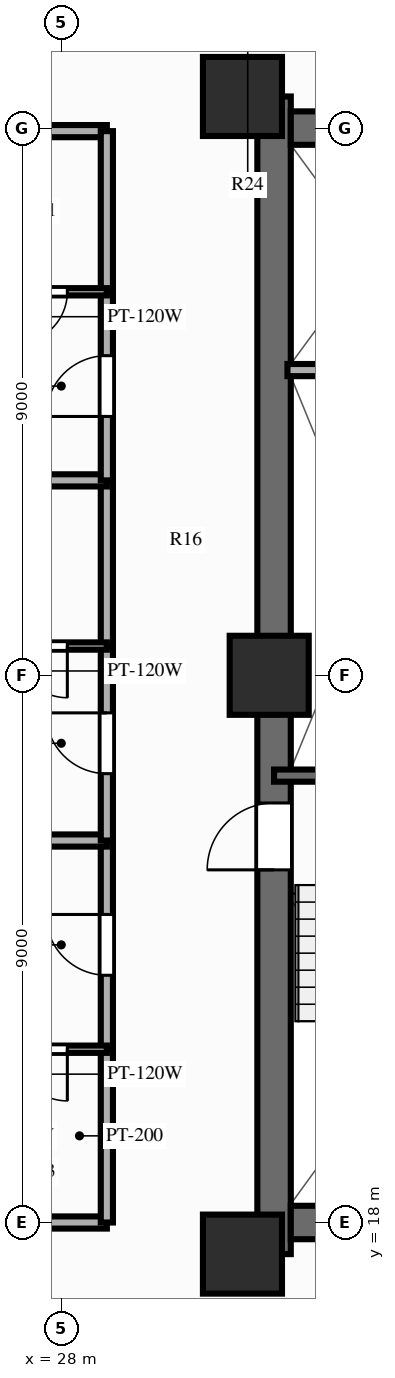
"""IFC4 building model, lengths in metres.
Left out: names, types, materials, properties, quantities, classifications, styles, units other than length and angle.
Written with IfcOpenShell. Run it as: python <this file> out.ifc"""

import sys

from ifc_helpers import new_model, si_unit, direction, frame, frame_2d, origin, origin_2d, place, context, subcontext, project, spatial, rectangle, extrude, source, transform, mapped, element, fill, save


model = new_model("IFC4")
c1 = context("Model", 3, precision=1e-05, world=origin(), true_north=direction((0.0, 1.0)))
c2 = subcontext(c1, "Body", "Model", "MODEL_VIEW")
j1 = project(units=[si_unit("LENGTHUNIT", "METRE"), si_unit("PLANEANGLEUNIT", "RADIAN")], contexts=[c1])
p1 = place(None, origin())
s1 = spatial("IfcSite", under=j1, at=p1, CompositionType="ELEMENT")
p2 = place(p1, origin())
s2 = spatial("IfcBuilding", under=s1, at=p2, CompositionType="ELEMENT")
p3 = place(p2, frame((0.0, 0.0, 86.85)))
s3 = spatial("IfcBuildingStorey", under=s2, at=p3, CompositionType="ELEMENT", Elevation=86.85)
p4 = place(p3, frame((31.5, 17.48, 0.0), z_axis=(0.0, 0.0, 1.0), x_axis=(0.0, 1.0, 0.0)))
e1 = element("IfcWall", 1, at=p4, inside=s3, PredefinedType="SHEAR", context=c2, shape_type="SweptSolid", body=[
    extrude(rectangle(XDim=19.04, YDim=0.55, at=frame_2d((9.52, 0.0))), origin(), (0.0, 0.0, 1.0), 3.0),
])
p5 = place(p4, frame((6.32, 0.0, 0.0)))
e2 = element("IfcOpeningElement", 2, at=p5, cuts=e1, PredefinedType="OPENING", context=c2, shape_type="SweptSolid", body=[
    extrude(rectangle(XDim=1.1, YDim=2.15, at=frame_2d((0.55, 1.075))), frame((0.0, 0.287, 0.0), z_axis=(0.0, -1.0, 0.0), x_axis=(1.0, 0.0, 0.0)), (0.0, 0.0, 1.0), 0.574),
])
p6 = place(p3, frame((31.775, 18.0, 0.0), z_axis=(0.0, 0.0, 1.0), x_axis=(1.0, 0.0, 0.0)))
e3 = element("IfcWall", 3, at=p6, inside=s3, PredefinedType="SHEAR", context=c2, shape_type="SweptSolid", body=[
    extrude(rectangle(XDim=12.45, YDim=0.55, at=frame_2d((6.225, 0.0))), origin(), (0.0, 0.0, 1.0), 3.0),
])
p7 = place(p3, frame((31.775, 36.0, 0.0), z_axis=(0.0, 0.0, 1.0), x_axis=(1.0, 0.0, 0.0)))
e4 = element("IfcWall", 4, at=p7, inside=s3, PredefinedType="SHEAR", context=c2, shape_type="SweptSolid", body=[
    extrude(rectangle(XDim=12.45, YDim=0.55, at=frame_2d((6.225, 0.0))), origin(), (0.0, 0.0, 1.0), 3.0),
])
p8 = place(p7, frame((5.175, 0.0, 0.0), z_axis=(0.0, 0.0, 1.0), x_axis=(-1.0, 0.0, 0.0)))
e5 = element("IfcOpeningElement", 5, at=p8, cuts=e4, PredefinedType="OPENING", context=c2, shape_type="SweptSolid", body=[
    extrude(rectangle(XDim=1.4, YDim=2.15, at=frame_2d((0.7, 1.075))), frame((0.0, 0.287, 0.0), z_axis=(0.0, -1.0, 0.0), x_axis=(1.0, 0.0, 0.0)), (0.0, 0.0, 1.0), 0.574),
])
m1 = source(origin(), c2, "Body", "SweptSolid", [
    extrude(rectangle(XDim=1.3, YDim=1.3, at=origin_2d()), origin(), (0.0, 0.0, 1.0), 3.0),
])
for number, where, z_axis, x_axis in (
    (6, (30.98, 17.48, 0.0), (0.0, 0.0, 1.0), (1.0, 0.0, 0.0)),
    (7, (30.98, 36.52, 0.0), (0.0, 0.0, 1.0), (1.0, 0.0, 0.0)),
    (8, (31.42, 27.0, 0.0), (0.0, 0.0, 1.0), (1.0, 0.0, 0.0)),
):
    element("IfcColumn", number, at=place(p3, frame(where, z_axis=z_axis, x_axis=x_axis)), inside=s3, PredefinedType="COLUMN", context=c2, shape_type="MappedRepresentation", body=[
        mapped(m1, transform((0.0, 0.0, 0.0), scale=1.0)),
    ])
p9 = place(p3, frame((31.5, 25.35, 0.0), z_axis=(0.0, 0.0, 1.0), x_axis=(1.0, 0.0, 0.0)))
e9 = element("IfcWall", 9, at=p9, inside=s3, PredefinedType="SOLIDWALL", context=c2, shape_type="SweptSolid", body=[
    extrude(rectangle(XDim=3.93, YDim=0.2, at=frame_2d((1.965, 0.0))), origin(), (0.0, 0.0, 1.0), 2.79),
])
p10 = place(p3, frame((31.72, 32.02, 0.0), z_axis=(0.0, 0.0, 1.0), x_axis=(1.0, 0.0, 0.0)))
e10 = element("IfcWall", 10, at=p10, inside=s3, PredefinedType="PARTITIONING", context=c2, shape_type="SweptSolid", body=[
    extrude(rectangle(XDim=2.8, YDim=0.2, at=frame_2d((1.4, 0.0))), origin(), (0.0, 0.0, 1.0), 2.79),
])
for number, where, z_axis, x_axis in (
    (11, (28.75, 18.0, 0.0), (0.0, 0.0, 1.0), (-1.0, 0.0, 0.0)),
    (12, (28.75, 35.95, 0.0), (0.0, 0.0, 1.0), (-1.0, 0.0, 0.0)),
):
    element("IfcWall", number, at=place(p3, frame(where, z_axis=z_axis, x_axis=x_axis)), inside=s3, PredefinedType="PARTITIONING", context=c2, shape_type="SweptSolid", body=[
        extrude(rectangle(XDim=16.6, YDim=0.2, at=frame_2d((8.3, 0.0))), origin(), (0.0, 0.0, 1.0), 2.34),
    ])
p11 = place(p3, frame((28.75, 18.0, 0.0), z_axis=(0.0, 0.0, 1.0), x_axis=(0.0, 1.0, 0.0)))
e13 = element("IfcWall", 13, at=p11, inside=s3, PredefinedType="PARTITIONING", context=c2, shape_type="SweptSolid", body=[
    extrude(rectangle(XDim=2.85, YDim=0.2, at=frame_2d((1.425, 0.0))), origin(), (0.0, 0.0, 1.0), 2.79),
])
p12 = place(p3, frame((28.75, 20.85, 0.0), z_axis=(0.0, 0.0, 1.0), x_axis=(0.0, 1.0, 0.0)))
e14 = element("IfcWall", 14, at=p12, inside=s3, PredefinedType="PARTITIONING", context=c2, shape_type="SweptSolid", body=[
    extrude(rectangle(XDim=3.432, YDim=0.2, at=frame_2d((1.716, 0.0))), origin(), (0.0, 0.0, 1.0), 2.79),
])
p13 = place(p12, frame((1.216, 0.0, 0.0)))
e15 = element("IfcOpeningElement", 15, at=p13, cuts=e14, PredefinedType="OPENING", context=c2, shape_type="SweptSolid", body=[
    extrude(rectangle(XDim=1.0, YDim=2.15, at=frame_2d((0.5, 1.075))), frame((0.0, 0.112, 0.0), z_axis=(0.0, -1.0, 0.0), x_axis=(1.0, 0.0, 0.0)), (0.0, 0.0, 1.0), 0.224),
])
p14 = place(p3, frame((28.75, 20.85, 0.0), z_axis=(0.0, 0.0, 1.0), x_axis=(-1.0, 0.0, 0.0)))
e16 = element("IfcWall", 16, at=p14, inside=s3, PredefinedType="PARTITIONING", context=c2, shape_type="SweptSolid", body=[
    extrude(rectangle(XDim=2.15, YDim=0.12, at=frame_2d((1.075, 0.0))), origin(), (0.0, 0.0, 1.0), 2.79),
])
p15 = place(p14, frame((0.65, 0.0, 0.0)))
e17 = element("IfcOpeningElement", 17, at=p15, cuts=e16, PredefinedType="OPENING", context=c2, shape_type="SweptSolid", body=[
    extrude(rectangle(XDim=0.85, YDim=2.05, at=frame_2d((0.425, 1.025))), frame((0.0, 0.072, 0.0), z_axis=(0.0, -1.0, 0.0), x_axis=(1.0, 0.0, 0.0)), (0.0, 0.0, 1.0), 0.144),
])
p16 = place(p3, frame((28.75, 24.282, 0.0), z_axis=(0.0, 0.0, 1.0), x_axis=(-1.0, 0.0, 0.0)))
e18 = element("IfcWall", 18, at=p16, inside=s3, PredefinedType="PARTITIONING", context=c2, shape_type="SweptSolid", body=[
    extrude(rectangle(XDim=16.6, YDim=0.2, at=frame_2d((8.3, 0.0))), origin(), (0.0, 0.0, 1.0), 2.79),
])
p17 = place(p3, frame((28.75, 24.282, 0.0), z_axis=(0.0, 0.0, 1.0), x_axis=(0.0, 1.0, 0.0)))
e19 = element("IfcWall", 19, at=p17, inside=s3, PredefinedType="PARTITIONING", context=c2, shape_type="SweptSolid", body=[
    extrude(rectangle(XDim=3.199, YDim=0.2, at=frame_2d((1.599, 0.0))), origin(), (0.0, 0.0, 1.0), 2.79),
])
p18 = place(p17, frame((1.099, 0.0, 0.0)))
e20 = element("IfcOpeningElement", 20, at=p18, cuts=e19, PredefinedType="OPENING", context=c2, shape_type="SweptSolid", body=[
    extrude(rectangle(XDim=1.0, YDim=2.15, at=frame_2d((0.5, 1.075))), frame((0.0, 0.112, 0.0), z_axis=(0.0, -1.0, 0.0), x_axis=(1.0, 0.0, 0.0)), (0.0, 0.0, 1.0), 0.224),
])
p19 = place(p3, frame((28.75, 27.481, 0.0), z_axis=(0.0, 0.0, 1.0), x_axis=(0.0, 1.0, 0.0)))
e21 = element("IfcWall", 21, at=p19, inside=s3, PredefinedType="PARTITIONING", context=c2, shape_type="SweptSolid", body=[
    extrude(rectangle(XDim=2.725, YDim=0.2, at=frame_2d((1.362, 0.0))), origin(), (0.0, 0.0, 1.0), 2.79),
])
p20 = place(p3, frame((28.75, 27.481, 0.0), z_axis=(0.0, 0.0, 1.0), x_axis=(-1.0, 0.0, 0.0)))
e22 = element("IfcWall", 22, at=p20, inside=s3, PredefinedType="PARTITIONING", context=c2, shape_type="SweptSolid", body=[
    extrude(rectangle(XDim=2.15, YDim=0.12, at=frame_2d((1.075, 0.0))), origin(), (0.0, 0.0, 1.0), 2.79),
])
p21 = place(p20, frame((0.65, 0.0, 0.0)))
e23 = element("IfcOpeningElement", 23, at=p21, cuts=e22, PredefinedType="OPENING", context=c2, shape_type="SweptSolid", body=[
    extrude(rectangle(XDim=0.85, YDim=2.05, at=frame_2d((0.425, 1.025))), frame((0.0, 0.072, 0.0), z_axis=(0.0, -1.0, 0.0), x_axis=(1.0, 0.0, 0.0)), (0.0, 0.0, 1.0), 0.144),
])
p22 = place(p3, frame((28.75, 30.206, 0.0), z_axis=(0.0, 0.0, 1.0), x_axis=(-1.0, 0.0, 0.0)))
e24 = element("IfcWall", 24, at=p22, inside=s3, PredefinedType="PARTITIONING", context=c2, shape_type="SweptSolid", body=[
    extrude(rectangle(XDim=16.6, YDim=0.2, at=frame_2d((8.3, 0.0))), origin(), (0.0, 0.0, 1.0), 2.79),
])
p23 = place(p3, frame((28.75, 30.206, 0.0), z_axis=(0.0, 0.0, 1.0), x_axis=(0.0, 1.0, 0.0)))
e25 = element("IfcWall", 25, at=p23, inside=s3, PredefinedType="PARTITIONING", context=c2, shape_type="SweptSolid", body=[
    extrude(rectangle(XDim=3.102, YDim=0.2, at=frame_2d((1.551, 0.0))), origin(), (0.0, 0.0, 1.0), 2.79),
])
p24 = place(p23, frame((1.051, 0.0, 0.0)))
e26 = element("IfcOpeningElement", 26, at=p24, cuts=e25, PredefinedType="OPENING", context=c2, shape_type="SweptSolid", body=[
    extrude(rectangle(XDim=1.0, YDim=2.15, at=frame_2d((0.5, 1.075))), frame((0.0, 0.112, 0.0), z_axis=(0.0, -1.0, 0.0), x_axis=(1.0, 0.0, 0.0)), (0.0, 0.0, 1.0), 0.224),
])
p25 = place(p3, frame((28.75, 33.308, 0.0), z_axis=(0.0, 0.0, 1.0), x_axis=(0.0, 1.0, 0.0)))
e27 = element("IfcWall", 27, at=p25, inside=s3, PredefinedType="PARTITIONING", context=c2, shape_type="SweptSolid", body=[
    extrude(rectangle(XDim=2.642, YDim=0.2, at=frame_2d((1.321, 0.0))), origin(), (0.0, 0.0, 1.0), 2.79),
])
p26 = place(p3, frame((28.75, 33.308, 0.0), z_axis=(0.0, 0.0, 1.0), x_axis=(-1.0, 0.0, 0.0)))
e28 = element("IfcWall", 28, at=p26, inside=s3, PredefinedType="PARTITIONING", context=c2, shape_type="SweptSolid", body=[
    extrude(rectangle(XDim=2.15, YDim=0.12, at=frame_2d((1.075, 0.0))), origin(), (0.0, 0.0, 1.0), 2.79),
])
p27 = place(p26, frame((0.65, 0.0, 0.0)))
e29 = element("IfcOpeningElement", 29, at=p27, cuts=e28, PredefinedType="OPENING", context=c2, shape_type="SweptSolid", body=[
    extrude(rectangle(XDim=0.85, YDim=2.05, at=frame_2d((0.425, 1.025))), frame((0.0, 0.072, 0.0), z_axis=(0.0, -1.0, 0.0), x_axis=(1.0, 0.0, 0.0)), (0.0, 0.0, 1.0), 0.144),
])
m2 = source(origin(), c2, "Body", "SweptSolid", [
    extrude(rectangle(XDim=1.1, YDim=2.15, at=frame_2d((0.55, 1.075))), frame((0.0, 0.025, 0.0), z_axis=(0.0, -1.0, 0.0), x_axis=(1.0, 0.0, 0.0)), (0.0, 0.0, 1.0), 0.05),
])
p28 = place(p5, origin())
e30 = element("IfcDoor", 30, at=p28, inside=s3, OperationType="SINGLE_SWING_LEFT", PredefinedType="DOOR", context=c2, shape_type="MappedRepresentation", body=[
    mapped(m2, transform((0.0, 0.0, 0.0), scale=1.0)),
])
fill(e2, e30)
m3 = source(origin(), c2, "Body", "SweptSolid", [
    extrude(rectangle(XDim=1.0, YDim=2.15, at=frame_2d((0.5, 1.075))), frame((0.0, 0.025, 0.0), z_axis=(0.0, -1.0, 0.0), x_axis=(1.0, 0.0, 0.0)), (0.0, 0.0, 1.0), 0.05),
])
p29 = place(p13, origin())
e31 = element("IfcDoor", 31, at=p29, inside=s3, OperationType="SINGLE_SWING_RIGHT", PredefinedType="DOOR", context=c2, shape_type="MappedRepresentation", body=[
    mapped(m3, transform((0.0, 0.0, 0.0), scale=1.0)),
])
fill(e15, e31)
m4 = source(origin(), c2, "Body", "SweptSolid", [
    extrude(rectangle(XDim=0.85, YDim=2.05, at=frame_2d((0.425, 1.025))), frame((0.0, 0.025, 0.0), z_axis=(0.0, -1.0, 0.0), x_axis=(1.0, 0.0, 0.0)), (0.0, 0.0, 1.0), 0.05),
])
p30 = place(p15, origin())
e32 = element("IfcDoor", 32, at=p30, inside=s3, OperationType="SINGLE_SWING_LEFT", PredefinedType="DOOR", context=c2, shape_type="MappedRepresentation", body=[
    mapped(m4, transform((0.0, 0.0, 0.0), scale=1.0)),
])
fill(e17, e32)
p31 = place(p18, origin())
e33 = element("IfcDoor", 33, at=p31, inside=s3, OperationType="SINGLE_SWING_RIGHT", PredefinedType="DOOR", context=c2, shape_type="MappedRepresentation", body=[
    mapped(m3, transform((0.0, 0.0, 0.0), scale=1.0)),
])
fill(e20, e33)
p32 = place(p21, origin())
e34 = element("IfcDoor", 34, at=p32, inside=s3, OperationType="SINGLE_SWING_LEFT", PredefinedType="DOOR", context=c2, shape_type="MappedRepresentation", body=[
    mapped(m4, transform((0.0, 0.0, 0.0), scale=1.0)),
])
fill(e23, e34)
p33 = place(p24, origin())
e35 = element("IfcDoor", 35, at=p33, inside=s3, OperationType="SINGLE_SWING_LEFT", PredefinedType="DOOR", context=c2, shape_type="MappedRepresentation", body=[
    mapped(m3, transform((0.0, 0.0, 0.0), scale=1.0)),
])
fill(e26, e35)
p34 = place(p27, origin())
e36 = element("IfcDoor", 36, at=p34, inside=s3, OperationType="SINGLE_SWING_RIGHT", PredefinedType="DOOR", context=c2, shape_type="MappedRepresentation", body=[
    mapped(m4, transform((0.0, 0.0, 0.0), scale=1.0)),
])
fill(e29, e36)
save(model, sys.argv[1])
